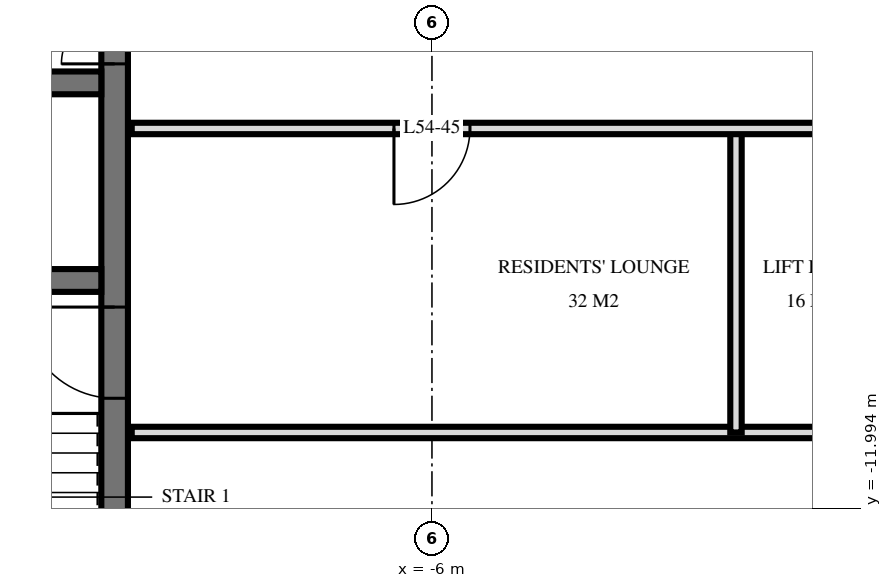
"""IFC4 building model, lengths in metres.
Left out: names, types, materials, properties, quantities, classifications, styles, units other than length and angle.
Written with IfcOpenShell. Run it as: python <this file> out.ifc"""

import sys

from ifc_helpers import new_model, si_unit, direction, frame, frame_2d, origin, place, context, subcontext, project, spatial, rectangle, extrude, element, fill, save


model = new_model("IFC4")
c1 = context("Model", 3, precision=1e-05, world=origin(), true_north=direction((0.0, 1.0)))
c2 = subcontext(c1, "Body", "Model", "MODEL_VIEW")
j1 = project(units=[si_unit("LENGTHUNIT", "METRE"), si_unit("PLANEANGLEUNIT", "RADIAN")], contexts=[c1])
p1 = place(None, origin())
s1 = spatial("IfcSite", under=j1, at=p1, CompositionType="ELEMENT")
p2 = place(p1, origin())
s2 = spatial("IfcBuilding", under=s1, at=p2, CompositionType="ELEMENT")
p3 = place(p2, frame((0.0, 0.0, 208.1)))
s3 = spatial("IfcBuildingStorey", under=s2, at=p3, CompositionType="ELEMENT", Elevation=208.1)
p4 = place(p3, frame((-10.175, -14.55, 0.0), z_axis=(0.0, 0.0, 1.0), x_axis=(0.0, 1.0, 0.0)))
e1 = element("IfcWall", 1, at=p4, inside=s3, PredefinedType="SHEAR", context=c2, shape_type="SweptSolid", body=[
    extrude(rectangle(XDim=14.1, YDim=0.35, at=frame_2d((7.05, 0.0))), origin(), (0.0, 0.0, 1.0), 3.5),
])
p5 = place(p4, frame((8.4, 0.0, 0.0)))
e2 = element("IfcOpeningElement", 2, at=p5, cuts=e1, PredefinedType="OPENING", context=c2, shape_type="SweptSolid", body=[
    extrude(rectangle(XDim=1.4, YDim=2.4, at=frame_2d((0.7, 1.2))), frame((0.0, 0.185, 0.0), z_axis=(0.0, -1.0, 0.0), x_axis=(1.0, 0.0, 0.0)), (0.0, 0.0, 1.0), 0.37),
])
p6 = place(p4, frame((10.0, 0.0, 0.0)))
e3 = element("IfcOpeningElement", 3, at=p6, cuts=e1, PredefinedType="OPENING", context=c2, shape_type="SweptSolid", body=[
    extrude(rectangle(XDim=1.4, YDim=2.4, at=frame_2d((0.7, 1.2))), frame((0.0, 0.185, 0.0), z_axis=(0.0, -1.0, 0.0), x_axis=(1.0, 0.0, 0.0)), (0.0, 0.0, 1.0), 0.37),
])
p7 = place(p4, frame((4.0, 0.0, 0.0)))
e4 = element("IfcOpeningElement", 4, at=p7, cuts=e1, PredefinedType="OPENING", context=c2, shape_type="SweptSolid", body=[
    extrude(rectangle(XDim=1.2, YDim=2.1, at=frame_2d((0.6, 1.05))), frame((0.0, 0.185, 0.0), z_axis=(0.0, -1.0, 0.0), x_axis=(1.0, 0.0, 0.0)), (0.0, 0.0, 1.0), 0.37),
])
p8 = place(p3, frame((-24.05, -6.4, 0.0), z_axis=(0.0, 0.0, 1.0), x_axis=(1.0, 0.0, 0.0)))
e5 = element("IfcWall", 5, at=p8, inside=s3, PredefinedType="SHEAR", context=c2, shape_type="SweptSolid", body=[
    extrude(rectangle(XDim=13.7, YDim=0.3, at=frame_2d((6.85, 0.0))), origin(), (0.0, 0.0, 1.0), 3.5),
])
p9 = place(p8, frame((0.55, 0.0, 0.0)))
e6 = element("IfcOpeningElement", 6, at=p9, cuts=e5, PredefinedType="OPENING", context=c2, shape_type="SweptSolid", body=[
    extrude(rectangle(XDim=1.1, YDim=2.1, at=frame_2d((0.55, 1.05))), frame((0.0, 0.16, 0.0), z_axis=(0.0, -1.0, 0.0), x_axis=(1.0, 0.0, 0.0)), (0.0, 0.0, 1.0), 0.32),
])
p10 = place(p8, frame((5.8, 0.0, 0.0)))
e7 = element("IfcOpeningElement", 7, at=p10, cuts=e5, PredefinedType="OPENING", context=c2, shape_type="SweptSolid", body=[
    extrude(rectangle(XDim=1.1, YDim=2.1, at=frame_2d((0.55, 1.05))), frame((0.0, 0.16, 0.0), z_axis=(0.0, -1.0, 0.0), x_axis=(1.0, 0.0, 0.0)), (0.0, 0.0, 1.0), 0.32),
])
p11 = place(p3, frame((-24.05, -9.0, 0.0), z_axis=(0.0, 0.0, 1.0), x_axis=(1.0, 0.0, 0.0)))
e8 = element("IfcWall", 8, at=p11, inside=s3, PredefinedType="SHEAR", context=c2, shape_type="SweptSolid", body=[
    extrude(rectangle(XDim=13.7, YDim=0.3, at=frame_2d((6.85, 0.0))), origin(), (0.0, 0.0, 1.0), 3.5),
])
p12 = place(p11, frame((8.8, 0.0, 0.0)))
e9 = element("IfcOpeningElement", 9, at=p12, cuts=e8, PredefinedType="OPENING", context=c2, shape_type="SweptSolid", body=[
    extrude(rectangle(XDim=1.1, YDim=2.1, at=frame_2d((0.55, 1.05))), frame((0.0, 0.16, 0.0), z_axis=(0.0, -1.0, 0.0), x_axis=(1.0, 0.0, 0.0)), (0.0, 0.0, 1.0), 0.32),
])
p13 = place(p3, frame((-2.0, -11.0, 0.0), z_axis=(0.0, 0.0, 1.0), x_axis=(0.0, 1.0, 0.0)))
e10 = element("IfcWall", 10, at=p13, inside=s3, PredefinedType="PARTITIONING", context=c2, shape_type="SweptSolid", body=[
    extrude(rectangle(XDim=4.0, YDim=0.15, at=frame_2d((2.0, 0.0))), origin(), (0.0, 0.0, 1.0), 3.22),
])
p14 = place(p3, frame((-9.95, -11.0, 0.0), z_axis=(0.0, 0.0, 1.0), x_axis=(1.0, 0.0, 0.0)))
e11 = element("IfcWall", 11, at=p14, inside=s3, PredefinedType="PARTITIONING", context=c2, shape_type="SweptSolid", body=[
    extrude(rectangle(XDim=19.9, YDim=0.15, at=frame_2d((9.95, 0.0))), origin(), (0.0, 0.0, 1.0), 3.22),
])
p15 = place(p14, frame((9.45, 0.0, 0.0)))
e12 = element("IfcOpeningElement", 12, at=p15, cuts=e11, PredefinedType="OPENING", context=c2, shape_type="SweptSolid", body=[
    extrude(rectangle(XDim=1.0, YDim=2.1, at=frame_2d((0.5, 1.05))), frame((0.0, 0.085, 0.0), z_axis=(0.0, -1.0, 0.0), x_axis=(1.0, 0.0, 0.0)), (0.0, 0.0, 1.0), 0.17),
])
p16 = place(p14, frame((15.45, 0.0, 0.0)))
e13 = element("IfcOpeningElement", 13, at=p16, cuts=e11, PredefinedType="OPENING", context=c2, shape_type="SweptSolid", body=[
    extrude(rectangle(XDim=1.0, YDim=2.1, at=frame_2d((0.5, 1.05))), frame((0.0, 0.085, 0.0), z_axis=(0.0, -1.0, 0.0), x_axis=(1.0, 0.0, 0.0)), (0.0, 0.0, 1.0), 0.17),
])
p17 = place(p3, frame((-9.95, -7.0, 0.0), z_axis=(0.0, 0.0, 1.0), x_axis=(1.0, 0.0, 0.0)))
e14 = element("IfcWall", 14, at=p17, inside=s3, PredefinedType="PARTITIONING", context=c2, shape_type="SweptSolid", body=[
    extrude(rectangle(XDim=19.9, YDim=0.15, at=frame_2d((9.95, 0.0))), origin(), (0.0, 0.0, 1.0), 3.22),
])
p18 = place(p17, frame((9.45, 0.0, 0.0)))
e15 = element("IfcOpeningElement", 15, at=p18, cuts=e14, PredefinedType="OPENING", context=c2, shape_type="SweptSolid", body=[
    extrude(rectangle(XDim=1.0, YDim=2.1, at=frame_2d((0.5, 1.05))), frame((0.0, 0.085, 0.0), z_axis=(0.0, -1.0, 0.0), x_axis=(1.0, 0.0, 0.0)), (0.0, 0.0, 1.0), 0.17),
])
p19 = place(p17, frame((3.45, 0.0, 0.0)))
e16 = element("IfcOpeningElement", 16, at=p19, cuts=e14, PredefinedType="OPENING", context=c2, shape_type="SweptSolid", body=[
    extrude(rectangle(XDim=1.0, YDim=2.1, at=frame_2d((0.5, 1.05))), frame((0.0, 0.085, 0.0), z_axis=(0.0, -1.0, 0.0), x_axis=(1.0, 0.0, 0.0)), (0.0, 0.0, 1.0), 0.17),
])
p20 = place(p5, origin())
e17 = element("IfcDoor", 17, at=p20, inside=s3, OperationType="DOUBLE_DOOR_SINGLE_SWING", PredefinedType="DOOR", context=c2, shape_type="SweptSolid", body=[
    extrude(rectangle(XDim=1.4, YDim=2.4, at=frame_2d((0.7, 1.2))), frame((0.0, 0.025, 0.0), z_axis=(0.0, -1.0, 0.0), x_axis=(1.0, 0.0, 0.0)), (0.0, 0.0, 1.0), 0.05),
])
fill(e2, e17)
p21 = place(p7, origin())
e18 = element("IfcDoor", 18, at=p21, inside=s3, OperationType="SINGLE_SWING_LEFT", PredefinedType="DOOR", context=c2, shape_type="SweptSolid", body=[
    extrude(rectangle(XDim=1.2, YDim=2.1, at=frame_2d((0.6, 1.05))), frame((0.0, 0.025, 0.0), z_axis=(0.0, -1.0, 0.0), x_axis=(1.0, 0.0, 0.0)), (0.0, 0.0, 1.0), 0.05),
])
fill(e4, e18)
p22 = place(p19, frame((0.5, 0.0, 0.0), z_axis=(0.0, 0.0, 1.0), x_axis=(-1.0, 0.0, 0.0)))
e19 = element("IfcDoor", 19, at=p22, inside=s3, OperationType="SINGLE_SWING_LEFT", PredefinedType="DOOR", context=c2, shape_type="SweptSolid", body=[
    extrude(rectangle(XDim=1.0, YDim=2.1, at=frame_2d((0.0, 1.05))), frame((0.0, -0.025, 0.0), z_axis=(0.0, 1.0, 0.0), x_axis=(-1.0, 0.0, 0.0)), (0.0, 0.0, 1.0), 0.05),
])
fill(e16, e19)
save(model, sys.argv[1])
